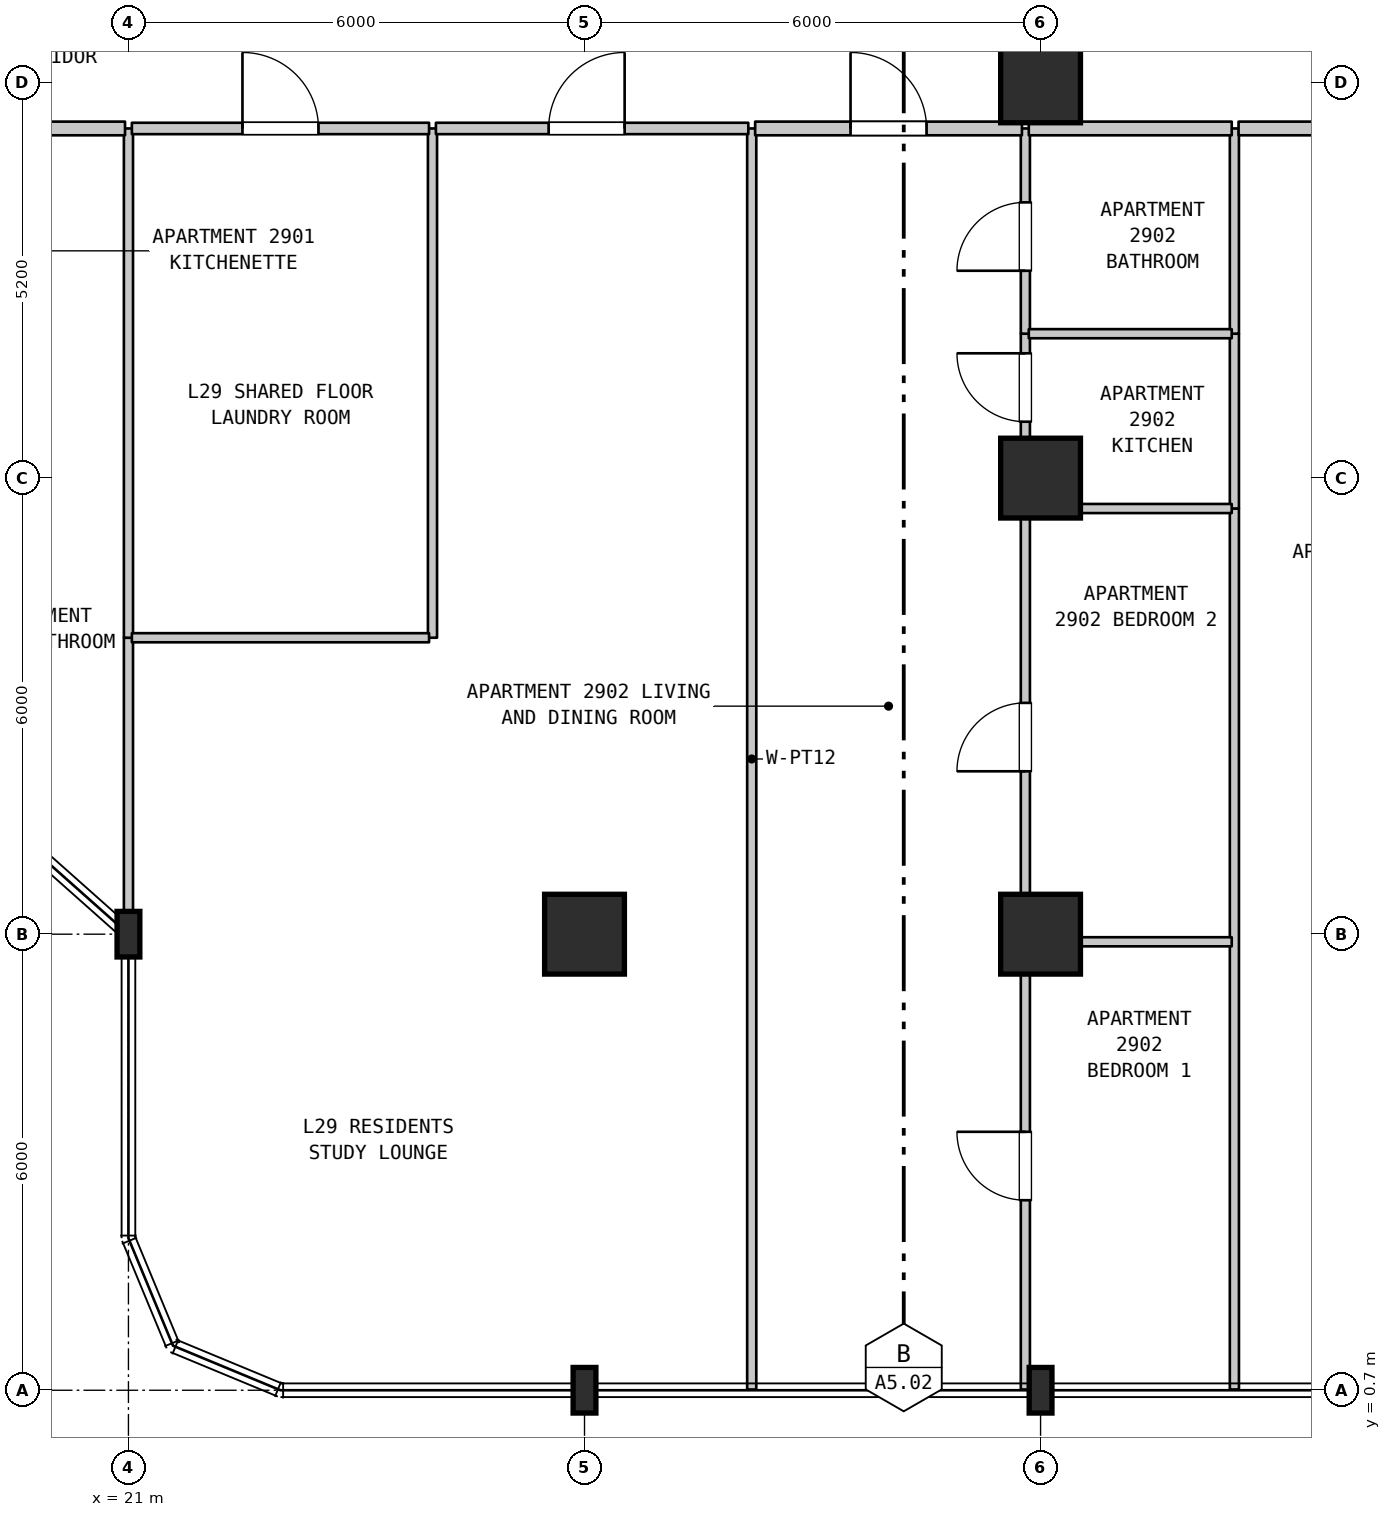
"""IFC4 building model, lengths in metres.
Left out: names, types, materials, properties, quantities, classifications, styles, units other than length and angle.
Written with IfcOpenShell. Run it as: python <this file> out.ifc"""

import sys

from ifc_helpers import new_model, si_unit, direction, frame, frame_2d, origin, origin_2d, place, context, subcontext, project, spatial, rectangle, i_section, extrude, element, fill, save


model = new_model("IFC4")
c1 = context("Model", 3, precision=1e-05, world=origin(), true_north=direction((0.0, 1.0)))
c2 = subcontext(c1, "Body", "Model", "MODEL_VIEW")
j1 = project(units=[si_unit("LENGTHUNIT", "METRE"), si_unit("PLANEANGLEUNIT", "RADIAN")], contexts=[c1])
p1 = place(None, origin())
s1 = spatial("IfcSite", under=j1, at=p1, CompositionType="ELEMENT")
p2 = place(p1, origin())
s2 = spatial("IfcBuilding", under=s1, at=p2, CompositionType="ELEMENT")
p3 = place(p2, frame((0.0, 0.0, 120.5)))
s3 = spatial("IfcBuildingStorey", under=s2, at=p3, CompositionType="ELEMENT", Elevation=120.5)
for number, where, z_axis, x_axis in (
    (1, (21.0, 6.7, 0.0), (0.0, 0.0, 1.0), (1.0, 0.0, 0.0)),
    (2, (27.0, 0.7, 0.0), (0.0, 0.0, 1.0), (1.0, 0.0, 0.0)),
):
    element("IfcColumn", number, at=place(p3, frame(where, z_axis=z_axis, x_axis=x_axis)), inside=s3, PredefinedType="COLUMN", context=c2, shape_type="SweptSolid", body=[
        extrude(i_section(OverallWidth=0.3, OverallDepth=0.6, WebThickness=0.015, FlangeThickness=0.03, FilletRadius=0.027, at=origin_2d()), origin(), (0.0, 0.0, 1.0), 4.8),
    ])
p4 = place(p3, frame((27.0, 6.7, 0.0), z_axis=(0.0, 0.0, 1.0), x_axis=(1.0, 0.0, 0.0)))
e3 = element("IfcColumn", 3, at=p4, inside=s3, PredefinedType="COLUMN", context=c2, shape_type="SweptSolid", body=[
    extrude(rectangle(XDim=1.05, YDim=1.05, at=origin_2d()), origin(), (0.0, 0.0, 1.0), 4.8),
])
p5 = place(p3, frame((33.0, 0.7, 0.0), z_axis=(0.0, 0.0, 1.0), x_axis=(1.0, 0.0, 0.0)))
e4 = element("IfcColumn", 4, at=p5, inside=s3, PredefinedType="COLUMN", context=c2, shape_type="SweptSolid", body=[
    extrude(i_section(OverallWidth=0.3, OverallDepth=0.6, WebThickness=0.015, FlangeThickness=0.03, FilletRadius=0.027, at=origin_2d()), origin(), (0.0, 0.0, 1.0), 4.8),
])
for number, where, z_axis, x_axis in (
    (5, (33.0, 6.7, 0.0), (0.0, 0.0, 1.0), (1.0, 0.0, 0.0)),
    (6, (33.0, 12.7, 0.0), (0.0, 0.0, 1.0), (1.0, 0.0, 0.0)),
    (7, (33.0, 17.9, 0.0), (0.0, 0.0, 1.0), (1.0, 0.0, 0.0)),
):
    element("IfcColumn", number, at=place(p3, frame(where, z_axis=z_axis, x_axis=x_axis)), inside=s3, PredefinedType="COLUMN", context=c2, shape_type="SweptSolid", body=[
        extrude(rectangle(XDim=1.05, YDim=1.05, at=origin_2d()), origin(), (0.0, 0.0, 1.0), 4.8),
    ])
p6 = place(p3, frame((21.0, 6.71, 0.0), z_axis=(0.0, 0.0, 1.0), x_axis=(0.0, 1.0, 0.0)))
e8 = element("IfcWall", 8, at=p6, inside=s3, PredefinedType="PARTITIONING", context=c2, shape_type="SweptSolid", body=[
    extrude(rectangle(XDim=3.89, YDim=0.12, at=frame_2d((1.945, 0.0))), origin(), (0.0, 0.0, 1.0), 4.48),
])
for number, where, z_axis, x_axis in (
    (9, (21.0, 10.6, 0.0), (0.0, 0.0, 1.0), (0.0, 1.0, 0.0)),
    (10, (25.0, 10.6, 0.0), (0.0, 0.0, 1.0), (0.0, 1.0, 0.0)),
):
    element("IfcWall", number, at=place(p3, frame(where, z_axis=z_axis, x_axis=x_axis)), inside=s3, PredefinedType="PARTITIONING", context=c2, shape_type="SweptSolid", body=[
        extrude(rectangle(XDim=6.7, YDim=0.12, at=frame_2d((3.35, 0.0))), origin(), (0.0, 0.0, 1.0), 4.48),
    ])
p7 = place(p3, frame((29.2, 0.71, 0.0), z_axis=(0.0, 0.0, 1.0), x_axis=(0.0, 1.0, 0.0)))
e11 = element("IfcWall", 11, at=p7, inside=s3, PredefinedType="PARTITIONING", context=c2, shape_type="SweptSolid", body=[
    extrude(rectangle(XDim=16.59, YDim=0.12, at=frame_2d((8.295, 0.0))), origin(), (0.0, 0.0, 1.0), 4.48),
])
p8 = place(p3, frame((32.8, 0.71, 0.0), z_axis=(0.0, 0.0, 1.0), x_axis=(0.0, 1.0, 0.0)))
e12 = element("IfcWall", 12, at=p8, inside=s3, PredefinedType="PARTITIONING", context=c2, shape_type="SweptSolid", body=[
    extrude(rectangle(XDim=11.59, YDim=0.12, at=frame_2d((5.795, 0.0))), origin(), (0.0, 0.0, 1.0), 4.48),
])
p9 = place(p8, frame((2.49, 0.0, 0.0)))
e13 = element("IfcOpeningElement", 13, at=p9, cuts=e12, PredefinedType="OPENING", context=c2, shape_type="SweptSolid", body=[
    extrude(rectangle(XDim=0.9, YDim=2.15, at=frame_2d((0.45, 1.075))), frame((0.0, 0.07, 0.0), z_axis=(0.0, -1.0, 0.0), x_axis=(1.0, 0.0, 0.0)), (0.0, 0.0, 1.0), 0.14),
])
p10 = place(p8, frame((8.133, 0.0, 0.0)))
e14 = element("IfcOpeningElement", 14, at=p10, cuts=e12, PredefinedType="OPENING", context=c2, shape_type="SweptSolid", body=[
    extrude(rectangle(XDim=0.9, YDim=2.15, at=frame_2d((0.45, 1.075))), frame((0.0, 0.07, 0.0), z_axis=(0.0, -1.0, 0.0), x_axis=(1.0, 0.0, 0.0)), (0.0, 0.0, 1.0), 0.14),
])
p11 = place(p3, frame((32.8, 12.3, 0.0), z_axis=(0.0, 0.0, 1.0), x_axis=(0.0, 1.0, 0.0)))
e15 = element("IfcWall", 15, at=p11, inside=s3, PredefinedType="PARTITIONING", context=c2, shape_type="SweptSolid", body=[
    extrude(rectangle(XDim=2.3, YDim=0.12, at=frame_2d((1.15, 0.0))), origin(), (0.0, 0.0, 1.0), 4.48),
])
p12 = place(p11, frame((1.142, 0.0, 0.0)))
e16 = element("IfcOpeningElement", 16, at=p12, cuts=e15, PredefinedType="OPENING", context=c2, shape_type="SweptSolid", body=[
    extrude(rectangle(XDim=0.9, YDim=2.15, at=frame_2d((0.45, 1.075))), frame((0.0, 0.07, 0.0), z_axis=(0.0, -1.0, 0.0), x_axis=(1.0, 0.0, 0.0)), (0.0, 0.0, 1.0), 0.14),
])
p13 = place(p3, frame((32.8, 14.6, 0.0), z_axis=(0.0, 0.0, 1.0), x_axis=(0.0, 1.0, 0.0)))
e17 = element("IfcWall", 17, at=p13, inside=s3, PredefinedType="PARTITIONING", context=c2, shape_type="SweptSolid", body=[
    extrude(rectangle(XDim=2.7, YDim=0.12, at=frame_2d((1.35, 0.0))), origin(), (0.0, 0.0, 1.0), 4.48),
])
p14 = place(p13, frame((0.828, 0.0, 0.0)))
e18 = element("IfcOpeningElement", 18, at=p14, cuts=e17, PredefinedType="OPENING", context=c2, shape_type="SweptSolid", body=[
    extrude(rectangle(XDim=0.9, YDim=2.1, at=frame_2d((0.45, 1.05))), frame((0.0, 0.07, 0.0), z_axis=(0.0, -1.0, 0.0), x_axis=(1.0, 0.0, 0.0)), (0.0, 0.0, 1.0), 0.14),
])
p15 = place(p3, frame((35.55, 0.71, 0.0), z_axis=(0.0, 0.0, 1.0), x_axis=(0.0, 1.0, 0.0)))
e19 = element("IfcWall", 19, at=p15, inside=s3, PredefinedType="PARTITIONING", context=c2, shape_type="SweptSolid", body=[
    extrude(rectangle(XDim=11.59, YDim=0.12, at=frame_2d((5.795, 0.0))), origin(), (0.0, 0.0, 1.0), 4.48),
])
p16 = place(p3, frame((35.55, 12.3, 0.0), z_axis=(0.0, 0.0, 1.0), x_axis=(0.0, 1.0, 0.0)))
e20 = element("IfcWall", 20, at=p16, inside=s3, PredefinedType="PARTITIONING", context=c2, shape_type="SweptSolid", body=[
    extrude(rectangle(XDim=2.3, YDim=0.12, at=frame_2d((1.15, 0.0))), origin(), (0.0, 0.0, 1.0), 4.48),
])
p17 = place(p3, frame((35.55, 14.6, 0.0), z_axis=(0.0, 0.0, 1.0), x_axis=(0.0, 1.0, 0.0)))
e21 = element("IfcWall", 21, at=p17, inside=s3, PredefinedType="PARTITIONING", context=c2, shape_type="SweptSolid", body=[
    extrude(rectangle(XDim=2.7, YDim=0.12, at=frame_2d((1.35, 0.0))), origin(), (0.0, 0.0, 1.0), 4.48),
])
p18 = place(p3, frame((32.845, 6.6, 0.0), z_axis=(0.0, 0.0, 1.0), x_axis=(1.0, 0.0, 0.0)))
e22 = element("IfcWall", 22, at=p18, inside=s3, PredefinedType="PARTITIONING", context=c2, shape_type="SweptSolid", body=[
    extrude(rectangle(XDim=2.67, YDim=0.12, at=frame_2d((1.335, 0.0))), origin(), (0.0, 0.0, 1.0), 4.03),
])
p19 = place(p3, frame((21.045, 10.6, 0.0), z_axis=(0.0, 0.0, 1.0), x_axis=(1.0, 0.0, 0.0)))
e23 = element("IfcWall", 23, at=p19, inside=s3, PredefinedType="PARTITIONING", context=c2, shape_type="SweptSolid", body=[
    extrude(rectangle(XDim=3.91, YDim=0.12, at=frame_2d((1.955, 0.0))), origin(), (0.0, 0.0, 1.0), 4.48),
])
for number, where, z_axis, x_axis in (
    (24, (32.845, 12.3, 0.0), (0.0, 0.0, 1.0), (1.0, 0.0, 0.0)),
    (25, (32.845, 14.6, 0.0), (0.0, 0.0, 1.0), (1.0, 0.0, 0.0)),
):
    element("IfcWall", number, at=place(p3, frame(where, z_axis=z_axis, x_axis=x_axis)), inside=s3, PredefinedType="PARTITIONING", context=c2, shape_type="SweptSolid", body=[
        extrude(rectangle(XDim=2.67, YDim=0.12, at=frame_2d((1.335, 0.0))), origin(), (0.0, 0.0, 1.0), 4.48),
    ])
p20 = place(p3, frame((19.095, 17.3, 0.0), z_axis=(0.0, 0.0, 1.0), x_axis=(1.0, 0.0, 0.0)))
e26 = element("IfcWall", 26, at=p20, inside=s3, PredefinedType="STANDARD", context=c2, shape_type="SweptSolid", body=[
    extrude(rectangle(XDim=1.86, YDim=0.18, at=frame_2d((0.93, 0.0))), origin(), (0.0, 0.0, 1.0), 4.48),
])
p21 = place(p3, frame((21.045, 17.3, 0.0), z_axis=(0.0, 0.0, 1.0), x_axis=(1.0, 0.0, 0.0)))
e27 = element("IfcWall", 27, at=p21, inside=s3, PredefinedType="STANDARD", context=c2, shape_type="SweptSolid", body=[
    extrude(rectangle(XDim=3.91, YDim=0.15, at=frame_2d((1.955, 0.0))), origin(), (0.0, 0.0, 1.0), 4.48),
])
p22 = place(p21, frame((1.455, 0.0, 0.0)))
e28 = element("IfcOpeningElement", 28, at=p22, cuts=e27, PredefinedType="OPENING", context=c2, shape_type="SweptSolid", body=[
    extrude(rectangle(XDim=1.0, YDim=2.15, at=frame_2d((0.5, 1.075))), frame((0.0, 0.085, 0.0), z_axis=(0.0, -1.0, 0.0), x_axis=(1.0, 0.0, 0.0)), (0.0, 0.0, 1.0), 0.17),
])
p23 = place(p3, frame((25.045, 17.3, 0.0), z_axis=(0.0, 0.0, 1.0), x_axis=(1.0, 0.0, 0.0)))
e29 = element("IfcWall", 29, at=p23, inside=s3, PredefinedType="STANDARD", context=c2, shape_type="SweptSolid", body=[
    extrude(rectangle(XDim=4.11, YDim=0.15, at=frame_2d((2.055, 0.0))), origin(), (0.0, 0.0, 1.0), 4.48),
])
p24 = place(p23, frame((1.483, 0.0, 0.0)))
e30 = element("IfcOpeningElement", 30, at=p24, cuts=e29, PredefinedType="OPENING", context=c2, shape_type="SweptSolid", body=[
    extrude(rectangle(XDim=1.0, YDim=2.15, at=frame_2d((0.5, 1.075))), frame((0.0, 0.085, 0.0), z_axis=(0.0, -1.0, 0.0), x_axis=(1.0, 0.0, 0.0)), (0.0, 0.0, 1.0), 0.17),
])
p25 = place(p3, frame((29.245, 17.3, 0.0), z_axis=(0.0, 0.0, 1.0), x_axis=(1.0, 0.0, 0.0)))
e31 = element("IfcWall", 31, at=p25, inside=s3, PredefinedType="STANDARD", context=c2, shape_type="SweptSolid", body=[
    extrude(rectangle(XDim=3.51, YDim=0.18, at=frame_2d((1.755, 0.0))), origin(), (0.0, 0.0, 1.0), 4.48),
])
p26 = place(p25, frame((1.255, 0.0, 0.0)))
e32 = element("IfcOpeningElement", 32, at=p26, cuts=e31, PredefinedType="OPENING", context=c2, shape_type="SweptSolid", body=[
    extrude(rectangle(XDim=1.0, YDim=2.15, at=frame_2d((0.5, 1.075))), frame((0.0, 0.1, 0.0), z_axis=(0.0, -1.0, 0.0), x_axis=(1.0, 0.0, 0.0)), (0.0, 0.0, 1.0), 0.2),
])
p27 = place(p3, frame((32.845, 17.3, 0.0), z_axis=(0.0, 0.0, 1.0), x_axis=(1.0, 0.0, 0.0)))
e33 = element("IfcWall", 33, at=p27, inside=s3, PredefinedType="STANDARD", context=c2, shape_type="SweptSolid", body=[
    extrude(rectangle(XDim=2.67, YDim=0.18, at=frame_2d((1.335, 0.0))), origin(), (0.0, 0.0, 1.0), 4.48),
])
p28 = place(p3, frame((35.605, 17.3, 0.0), z_axis=(0.0, 0.0, 1.0), x_axis=(1.0, 0.0, 0.0)))
e34 = element("IfcWall", 34, at=p28, inside=s3, PredefinedType="STANDARD", context=c2, shape_type="SweptSolid", body=[
    extrude(rectangle(XDim=3.51, YDim=0.18, at=frame_2d((1.755, 0.0))), origin(), (0.0, 0.0, 1.0), 4.48),
])
p29 = place(p28, frame((1.255, 0.0, 0.0)))
e35 = element("IfcOpeningElement", 35, at=p29, cuts=e34, PredefinedType="OPENING", context=c2, shape_type="SweptSolid", body=[
    extrude(rectangle(XDim=1.0, YDim=2.15, at=frame_2d((0.5, 1.075))), frame((0.0, 0.1, 0.0), z_axis=(0.0, -1.0, 0.0), x_axis=(1.0, 0.0, 0.0)), (0.0, 0.0, 1.0), 0.2),
])
p30 = place(p9, origin())
e36 = element("IfcDoor", 36, at=p30, inside=s3, OperationType="SINGLE_SWING_RIGHT", PredefinedType="DOOR", context=c2, shape_type="SweptSolid", body=[
    extrude(rectangle(XDim=0.9, YDim=2.15, at=frame_2d((0.45, 1.075))), frame((0.0, 0.025, 0.0), z_axis=(0.0, -1.0, 0.0), x_axis=(1.0, 0.0, 0.0)), (0.0, 0.0, 1.0), 0.05),
])
fill(e13, e36)
p31 = place(p10, origin())
e37 = element("IfcDoor", 37, at=p31, inside=s3, OperationType="SINGLE_SWING_LEFT", PredefinedType="DOOR", context=c2, shape_type="SweptSolid", body=[
    extrude(rectangle(XDim=0.9, YDim=2.15, at=frame_2d((0.45, 1.075))), frame((0.0, 0.025, 0.0), z_axis=(0.0, -1.0, 0.0), x_axis=(1.0, 0.0, 0.0)), (0.0, 0.0, 1.0), 0.05),
])
fill(e14, e37)
p32 = place(p12, origin())
e38 = element("IfcDoor", 38, at=p32, inside=s3, OperationType="SINGLE_SWING_RIGHT", PredefinedType="DOOR", context=c2, shape_type="SweptSolid", body=[
    extrude(rectangle(XDim=0.9, YDim=2.15, at=frame_2d((0.45, 1.075))), frame((0.0, 0.025, 0.0), z_axis=(0.0, -1.0, 0.0), x_axis=(1.0, 0.0, 0.0)), (0.0, 0.0, 1.0), 0.05),
])
fill(e16, e38)
p33 = place(p14, origin())
e39 = element("IfcDoor", 39, at=p33, inside=s3, OperationType="SINGLE_SWING_LEFT", PredefinedType="DOOR", context=c2, shape_type="SweptSolid", body=[
    extrude(rectangle(XDim=0.9, YDim=2.1, at=frame_2d((0.45, 1.05))), frame((0.0, 0.025, 0.0), z_axis=(0.0, -1.0, 0.0), x_axis=(1.0, 0.0, 0.0)), (0.0, 0.0, 1.0), 0.05),
])
fill(e18, e39)
p34 = place(p22, origin())
e40 = element("IfcDoor", 40, at=p34, inside=s3, OperationType="SINGLE_SWING_LEFT", PredefinedType="DOOR", context=c2, shape_type="SweptSolid", body=[
    extrude(rectangle(XDim=1.0, YDim=2.15, at=frame_2d((0.5, 1.075))), frame((0.0, 0.025, 0.0), z_axis=(0.0, -1.0, 0.0), x_axis=(1.0, 0.0, 0.0)), (0.0, 0.0, 1.0), 0.05),
])
fill(e28, e40)
p35 = place(p24, origin())
e41 = element("IfcDoor", 41, at=p35, inside=s3, OperationType="SINGLE_SWING_RIGHT", PredefinedType="DOOR", context=c2, shape_type="SweptSolid", body=[
    extrude(rectangle(XDim=1.0, YDim=2.15, at=frame_2d((0.5, 1.075))), frame((0.0, 0.025, 0.0), z_axis=(0.0, -1.0, 0.0), x_axis=(1.0, 0.0, 0.0)), (0.0, 0.0, 1.0), 0.05),
])
fill(e30, e41)
p36 = place(p26, origin())
e42 = element("IfcDoor", 42, at=p36, inside=s3, OperationType="SINGLE_SWING_LEFT", PredefinedType="DOOR", context=c2, shape_type="SweptSolid", body=[
    extrude(rectangle(XDim=1.0, YDim=2.15, at=frame_2d((0.5, 1.075))), frame((0.0, 0.025, 0.0), z_axis=(0.0, -1.0, 0.0), x_axis=(1.0, 0.0, 0.0)), (0.0, 0.0, 1.0), 0.05),
])
fill(e32, e42)
save(model, sys.argv[1])
